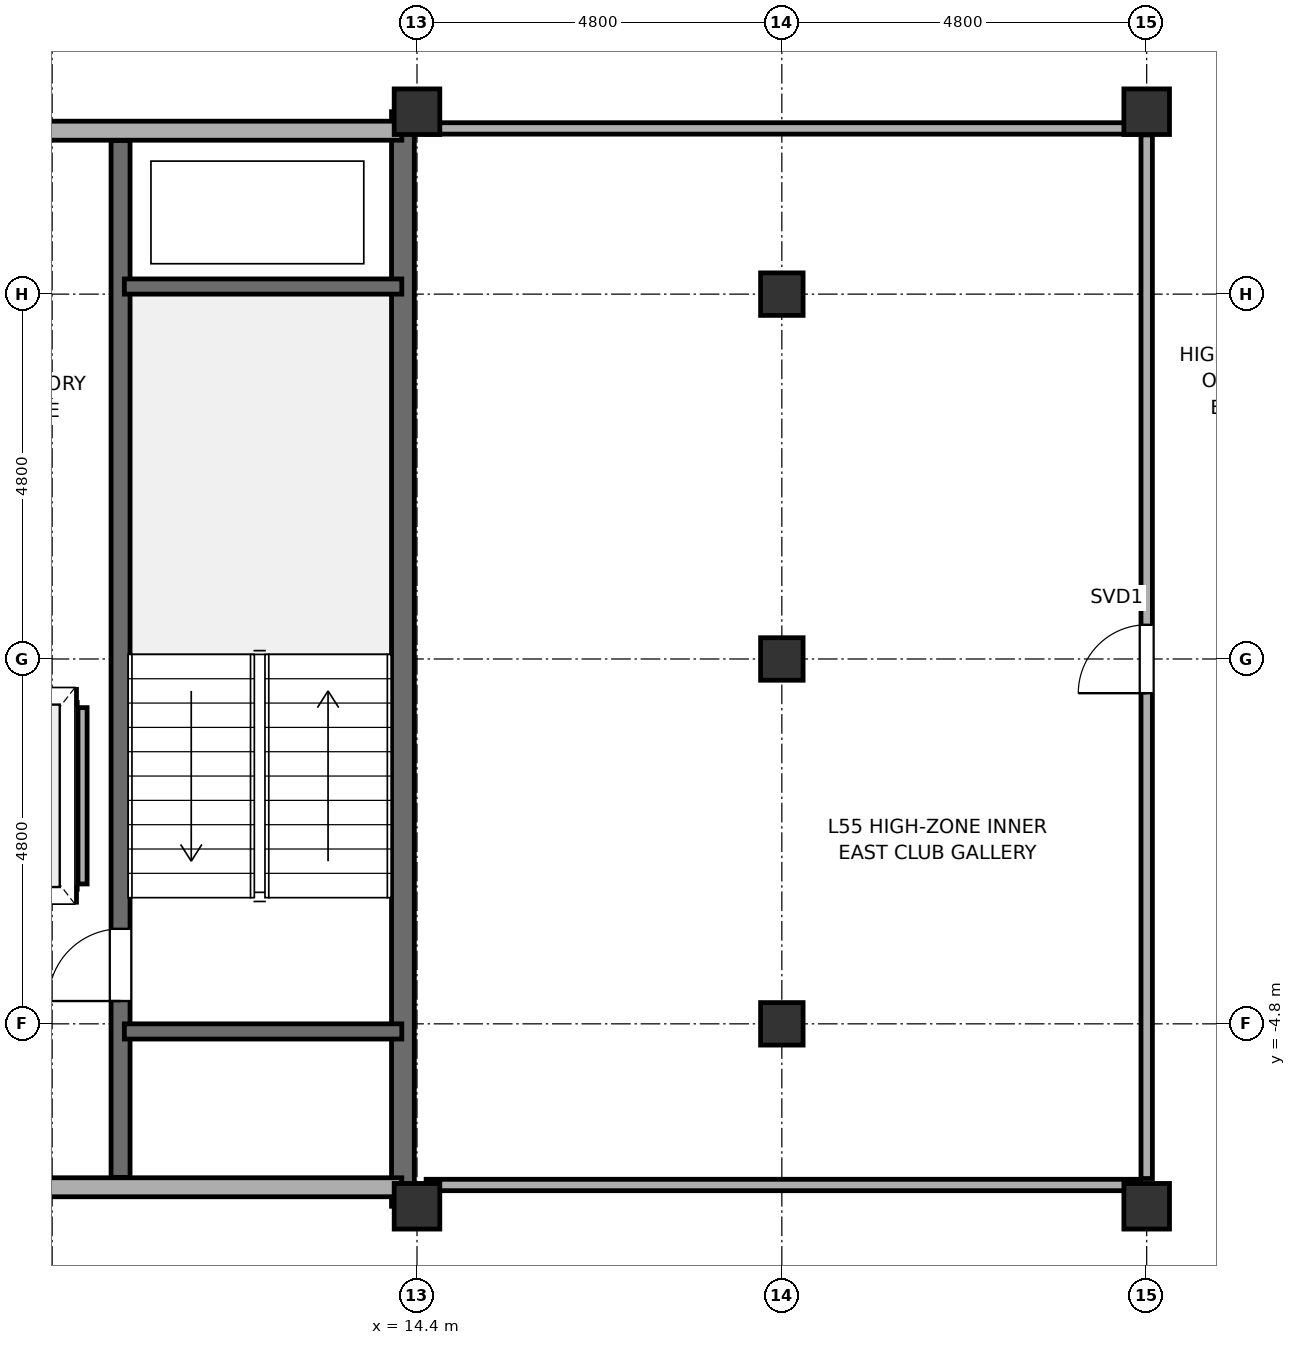
"""IFC4 building model, lengths in metres.
Left out: names, types, materials, properties, quantities, classifications, styles, units other than length and angle.
Written with IfcOpenShell. Run it as: python <this file> out.ifc"""

import sys

from ifc_helpers import new_model, si_unit, direction, frame, frame_2d, origin, origin_2d, place, context, subcontext, project, spatial, rectangle, hollow_rectangle, hollow_circle, extrude, element, fill, save


model = new_model("IFC4")
c1 = context("Model", 3, precision=1e-05, world=origin(), true_north=direction((0.0, 1.0)))
c2 = subcontext(c1, "Body", "Model", "MODEL_VIEW")
j1 = project(units=[si_unit("LENGTHUNIT", "METRE"), si_unit("PLANEANGLEUNIT", "RADIAN")], contexts=[c1])
p1 = place(None, origin())
s1 = spatial("IfcSite", under=j1, at=p1, CompositionType="ELEMENT")
p2 = place(p1, origin())
s2 = spatial("IfcBuilding", under=s1, at=p2, CompositionType="ELEMENT")
p3 = place(p2, frame((0.0, 0.0, 222.3)))
s3 = spatial("IfcBuildingStorey", under=s2, at=p3, CompositionType="ELEMENT", Elevation=222.3)
for number, where, z_axis, x_axis in (
    (1, (14.4, -7.2, 0.0), (0.0, 0.0, 1.0), (1.0, 0.0, 0.0)),
    (2, (14.4, 7.2, 0.0), (0.0, 0.0, 1.0), (1.0, 0.0, 0.0)),
):
    element("IfcColumn", number, at=place(p3, frame(where, z_axis=z_axis, x_axis=x_axis)), inside=s3, PredefinedType="COLUMN", context=c2, shape_type="SweptSolid", body=[
        extrude(hollow_rectangle(XDim=0.6, YDim=0.6, WallThickness=0.028, at=origin_2d()), origin(), (0.0, 0.0, 1.0), 3.85),
    ])
for number, where, z_axis, x_axis in (
    (3, (19.2, -4.8, 0.0), (0.0, 0.0, 1.0), (1.0, 0.0, 0.0)),
    (4, (19.2, 0.0, 0.0), (0.0, 0.0, 1.0), (1.0, 0.0, 0.0)),
    (5, (19.2, 4.8, 0.0), (0.0, 0.0, 1.0), (1.0, 0.0, 0.0)),
):
    element("IfcColumn", number, at=place(p3, frame(where, z_axis=z_axis, x_axis=x_axis)), inside=s3, PredefinedType="COLUMN", context=c2, shape_type="SweptSolid", body=[
        extrude(hollow_circle(Radius=0.28, WallThickness=0.025, at=origin_2d()), origin(), (0.0, 0.0, 1.0), 3.85),
    ])
for number, where, z_axis, x_axis in (
    (6, (24.0, -7.2, 0.0), (0.0, 0.0, 1.0), (1.0, 0.0, 0.0)),
    (7, (24.0, 7.2, 0.0), (0.0, 0.0, 1.0), (1.0, 0.0, 0.0)),
):
    element("IfcColumn", number, at=place(p3, frame(where, z_axis=z_axis, x_axis=x_axis)), inside=s3, PredefinedType="COLUMN", context=c2, shape_type="SweptSolid", body=[
        extrude(hollow_rectangle(XDim=0.6, YDim=0.6, WallThickness=0.028, at=origin_2d()), origin(), (0.0, 0.0, 1.0), 3.85),
    ])
p4 = place(p3, frame((14.215, -7.2, -0.18), z_axis=(0.0, 0.0, 1.0), x_axis=(0.0, 1.0, 0.0)))
e8 = element("IfcWall", 8, at=p4, inside=s3, PredefinedType="SHEAR", context=c2, shape_type="SweptSolid", body=[
    extrude(rectangle(XDim=14.4, YDim=0.3, at=frame_2d((7.2, 0.0))), origin(), (0.0, 0.0, 1.0), 3.85),
])
p5 = place(p3, frame((4.8, -6.95, 0.0), z_axis=(0.0, 0.0, 1.0), x_axis=(1.0, 0.0, 0.0)))
e9 = element("IfcWall", 9, at=p5, inside=s3, PredefinedType="SOLIDWALL", context=c2, shape_type="SweptSolid", body=[
    extrude(rectangle(XDim=9.4, YDim=0.25, at=frame_2d((4.7, 0.0))), origin(), (0.0, 0.0, 1.0), 2.27),
])
p6 = place(p5, frame((3.5, 0.0, 0.0)))
e10 = element("IfcOpeningElement", 10, at=p6, cuts=e9, PredefinedType="OPENING", context=c2, shape_type="SweptSolid", body=[
    extrude(rectangle(XDim=1.0, YDim=2.15, at=frame_2d((0.5, 1.075))), frame((0.0, 0.14, 0.0), z_axis=(0.0, -1.0, 0.0), x_axis=(1.0, 0.0, 0.0)), (0.0, 0.0, 1.0), 0.28),
])
p7 = place(p5, frame((0.95, 0.0, 0.0)))
e11 = element("IfcOpeningElement", 11, at=p7, cuts=e9, PredefinedType="OPENING", context=c2, shape_type="SweptSolid", body=[
    extrude(rectangle(XDim=0.9, YDim=2.1, at=frame_2d((0.45, 1.05))), frame((0.0, 0.14, 0.0), z_axis=(0.0, -1.0, 0.0), x_axis=(1.0, 0.0, 0.0)), (0.0, 0.0, 1.0), 0.28),
])
p8 = place(p3, frame((4.8, 6.95, 0.0), z_axis=(0.0, 0.0, 1.0), x_axis=(1.0, 0.0, 0.0)))
e12 = element("IfcWall", 12, at=p8, inside=s3, PredefinedType="SOLIDWALL", context=c2, shape_type="SweptSolid", body=[
    extrude(rectangle(XDim=9.4, YDim=0.25, at=frame_2d((4.7, 0.0))), origin(), (0.0, 0.0, 1.0), 2.27),
])
p9 = place(p8, frame((3.5, 0.0, 0.0)))
e13 = element("IfcOpeningElement", 13, at=p9, cuts=e12, PredefinedType="OPENING", context=c2, shape_type="SweptSolid", body=[
    extrude(rectangle(XDim=1.2, YDim=2.2, at=frame_2d((0.6, 1.1))), frame((0.0, 0.14, 0.0), z_axis=(0.0, -1.0, 0.0), x_axis=(1.0, 0.0, 0.0)), (0.0, 0.0, 1.0), 0.28),
])
p10 = place(p3, frame((10.5, -6.82, -0.18), z_axis=(0.0, 0.0, 1.0), x_axis=(0.0, 1.0, 0.0)))
e14 = element("IfcWall", 14, at=p10, inside=s3, PredefinedType="SOLIDWALL", context=c2, shape_type="SweptSolid", body=[
    extrude(rectangle(XDim=13.64, YDim=0.25, at=frame_2d((6.82, 0.0))), origin(), (0.0, 0.0, 1.0), 3.85),
])
p11 = place(p10, frame((2.32, 0.0, 0.18)))
e15 = element("IfcOpeningElement", 15, at=p11, cuts=e14, PredefinedType="OPENING", context=c2, shape_type="SweptSolid", body=[
    extrude(rectangle(XDim=0.95, YDim=2.15, at=frame_2d((0.475, 1.075))), frame((0.0, 0.14, 0.0), z_axis=(0.0, -1.0, 0.0), x_axis=(1.0, 0.0, 0.0)), (0.0, 0.0, 1.0), 0.28),
])
for number, where, z_axis, x_axis in (
    (16, (10.55, -4.9, -0.18), (0.0, 0.0, 1.0), (1.0, 0.0, 0.0)),
    (17, (10.55, 4.9, -0.18), (0.0, 0.0, 1.0), (1.0, 0.0, 0.0)),
):
    element("IfcWall", number, at=place(p3, frame(where, z_axis=z_axis, x_axis=x_axis)), inside=s3, PredefinedType="SOLIDWALL", context=c2, shape_type="SweptSolid", body=[
        extrude(rectangle(XDim=3.65, YDim=0.2, at=frame_2d((1.825, 0.0))), origin(), (0.0, 0.0, 1.0), 3.85),
    ])
p12 = place(p3, frame((7.88, -3.1, 0.0), z_axis=(0.0, 0.0, 1.0), x_axis=(1.0, 0.0, 0.0)))
e18 = element("IfcWall", 18, at=p12, inside=s3, PredefinedType="SOLIDWALL", context=c2, shape_type="SweptSolid", body=[
    extrude(rectangle(XDim=2.04, YDim=0.2, at=frame_2d((1.02, 0.0))), origin(), (0.0, 0.0, 1.0), 3.67),
])
p13 = place(p12, frame((0.47, 0.0, 0.0)))
e19 = element("IfcOpeningElement", 19, at=p13, cuts=e18, PredefinedType="OPENING", context=c2, shape_type="SweptSolid", body=[
    extrude(rectangle(XDim=1.1, YDim=2.2, at=frame_2d((0.55, 1.1))), frame((0.0, 0.115, 0.0), z_axis=(0.0, -1.0, 0.0), x_axis=(1.0, 0.0, 0.0)), (0.0, 0.0, 1.0), 0.23),
])
p14 = place(p3, frame((7.88, -0.5, 0.0), z_axis=(0.0, 0.0, 1.0), x_axis=(1.0, 0.0, 0.0)))
e20 = element("IfcWall", 20, at=p14, inside=s3, PredefinedType="SOLIDWALL", context=c2, shape_type="SweptSolid", body=[
    extrude(rectangle(XDim=2.04, YDim=0.2, at=frame_2d((1.02, 0.0))), origin(), (0.0, 0.0, 1.0), 3.67),
])
p15 = place(p3, frame((10.0, -2.96, 0.0), z_axis=(0.0, 0.0, 1.0), x_axis=(0.0, 1.0, 0.0)))
e21 = element("IfcWall", 21, at=p15, inside=s3, PredefinedType="PARTITIONING", context=c2, shape_type="SweptSolid", body=[
    extrude(rectangle(XDim=2.32, YDim=0.12, at=frame_2d((1.16, 0.0))), origin(), (0.0, 0.0, 1.0), 3.67),
])
for number, where, z_axis, x_axis in (
    (22, (14.52, -6.92, 0.0), (0.0, 0.0, 1.0), (1.0, 0.0, 0.0)),
    (23, (14.52, 6.98, 0.0), (0.0, 0.0, 1.0), (1.0, 0.0, 0.0)),
):
    element("IfcWall", number, at=place(p3, frame(where, z_axis=z_axis, x_axis=x_axis)), inside=s3, PredefinedType="PARTITIONING", context=c2, shape_type="SweptSolid", body=[
        extrude(rectangle(XDim=9.4, YDim=0.15, at=frame_2d((4.7, 0.0))), origin(), (0.0, 0.0, 1.0), 2.27),
    ])
p16 = place(p3, frame((24.0, -6.835, 0.0), z_axis=(0.0, 0.0, 1.0), x_axis=(0.0, 1.0, 0.0)))
e24 = element("IfcWall", 24, at=p16, inside=s3, PredefinedType="PARTITIONING", context=c2, shape_type="SweptSolid", body=[
    extrude(rectangle(XDim=13.73, YDim=0.15, at=frame_2d((6.865, 0.0))), origin(), (0.0, 0.0, 1.0), 2.27),
])
p17 = place(p16, frame((6.385, 0.0, 0.0)))
e25 = element("IfcOpeningElement", 25, at=p17, cuts=e24, PredefinedType="OPENING", context=c2, shape_type="SweptSolid", body=[
    extrude(rectangle(XDim=0.9, YDim=2.1, at=frame_2d((0.45, 1.05))), frame((0.0, 0.09, 0.0), z_axis=(0.0, -1.0, 0.0), x_axis=(1.0, 0.0, 0.0)), (0.0, 0.0, 1.0), 0.18),
])
p18 = place(p11, origin())
e26 = element("IfcDoor", 26, at=p18, inside=s3, OperationType="SINGLE_SWING_LEFT", PredefinedType="DOOR", context=c2, shape_type="SweptSolid", body=[
    extrude(rectangle(XDim=0.95, YDim=2.15, at=frame_2d((0.475, 1.075))), frame((0.0, 0.025, 0.0), z_axis=(0.0, -1.0, 0.0), x_axis=(1.0, 0.0, 0.0)), (0.0, 0.0, 1.0), 0.05),
])
fill(e15, e26)
p19 = place(p17, origin())
e27 = element("IfcDoor", 27, at=p19, inside=s3, OperationType="SINGLE_SWING_LEFT", PredefinedType="DOOR", context=c2, shape_type="SweptSolid", body=[
    extrude(rectangle(XDim=0.9, YDim=2.1, at=frame_2d((0.45, 1.05))), frame((0.0, 0.025, 0.0), z_axis=(0.0, -1.0, 0.0), x_axis=(1.0, 0.0, 0.0)), (0.0, 0.0, 1.0), 0.05),
])
fill(e25, e27)
save(model, sys.argv[1])
